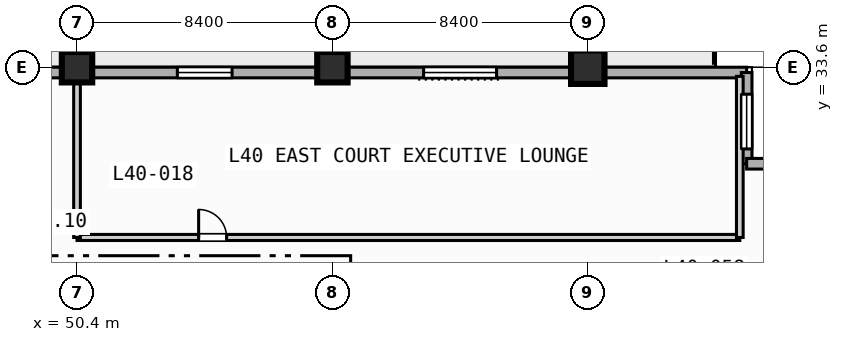
"""IFC4 building model, lengths in metres.
Left out: names, types, materials, properties, quantities, classifications, styles, units other than length and angle.
Written with IfcOpenShell. Run it as: python <this file> out.ifc"""

import sys

from ifc_helpers import new_model, si_unit, direction, frame, frame_2d, origin, origin_2d, place, context, subcontext, project, spatial, rectangle, extrude, element, fill, save


model = new_model("IFC4")
c1 = context("Model", 3, precision=1e-05, world=origin(), true_north=direction((0.0, 1.0)))
c2 = subcontext(c1, "Body", "Model", "MODEL_VIEW")
j1 = project(units=[si_unit("LENGTHUNIT", "METRE"), si_unit("PLANEANGLEUNIT", "RADIAN")], contexts=[c1])
p1 = place(None, origin())
s1 = spatial("IfcSite", under=j1, at=p1, CompositionType="ELEMENT")
p2 = place(p1, origin())
s2 = spatial("IfcBuilding", under=s1, at=p2, CompositionType="ELEMENT")
p3 = place(p2, frame((0.0, 0.0, 168.0)))
s3 = spatial("IfcBuildingStorey", under=s2, at=p3, CompositionType="ELEMENT", Elevation=168.0)
for number, where, z_axis, x_axis in (
    (1, (50.4, 33.6, 0.0), (0.0, 0.0, 1.0), (1.0, 0.0, 0.0)),
    (2, (58.8, 33.6, 0.0), (0.0, 0.0, 1.0), (1.0, 0.0, 0.0)),
):
    element("IfcColumn", number, at=place(p3, frame(where, z_axis=z_axis, x_axis=x_axis)), inside=s3, PredefinedType="COLUMN", context=c2, shape_type="SweptSolid", body=[
        extrude(rectangle(XDim=1.0, YDim=1.0, at=origin_2d()), origin(), (0.0, 0.0, 1.0), 3.7),
    ])
p4 = place(p3, frame((67.2, 33.6, 0.0), z_axis=(0.0, 0.0, 1.0), x_axis=(1.0, 0.0, 0.0)))
e3 = element("IfcColumn", 3, at=p4, inside=s3, PredefinedType="COLUMN", context=c2, shape_type="SweptSolid", body=[
    extrude(rectangle(XDim=1.1, YDim=1.1, at=origin_2d()), origin(), (0.0, 0.0, 1.0), 3.7),
])
p5 = place(p3, frame((33.425, 33.425, 0.0), z_axis=(0.0, 0.0, 1.0), x_axis=(1.0, 0.0, 0.0)))
e4 = element("IfcWall", 4, at=p5, inside=s3, PredefinedType="STANDARD", context=c2, shape_type="SweptSolid", body=[
    extrude(rectangle(XDim=39.0, YDim=0.35, at=frame_2d((19.5, 0.0))), origin(), (0.0, 0.0, 1.0), 3.47),
])
p6 = place(p5, frame((12.075, 0.0, 0.0)))
e5 = element("IfcOpeningElement", 5, at=p6, cuts=e4, PredefinedType="OPENING", context=c2, shape_type="SweptSolid", body=[
    extrude(rectangle(XDim=1.4, YDim=2.2, at=frame_2d((0.7, 1.1))), frame((0.0, 0.185, 0.0), z_axis=(0.0, -1.0, 0.0), x_axis=(1.0, 0.0, 0.0)), (0.0, 0.0, 1.0), 0.37),
])
p7 = place(p5, frame((20.275, 0.0, 0.85)))
e6 = element("IfcOpeningElement", 6, at=p7, cuts=e4, PredefinedType="OPENING", context=c2, shape_type="SweptSolid", body=[
    extrude(rectangle(XDim=1.8, YDim=1.8, at=frame_2d((0.9, 0.9))), frame((0.0, 0.185, 0.0), z_axis=(0.0, -1.0, 0.0), x_axis=(1.0, 0.0, 0.0)), (0.0, 0.0, 1.0), 0.37),
])
p8 = place(p5, frame((28.375, 0.0, 0.85)))
e7 = element("IfcOpeningElement", 7, at=p8, cuts=e4, PredefinedType="OPENING", context=c2, shape_type="SweptSolid", body=[
    extrude(rectangle(XDim=2.4, YDim=1.95, at=frame_2d((1.2, 0.975))), frame((0.0, 0.185, 0.0), z_axis=(0.0, -1.0, 0.0), x_axis=(1.0, 0.0, 0.0)), (0.0, 0.0, 1.0), 0.37),
])
p9 = place(p3, frame((72.425, 33.425, 0.0), z_axis=(0.0, 0.0, 1.0), x_axis=(0.0, -1.0, 0.0)))
e8 = element("IfcWall", 8, at=p9, inside=s3, PredefinedType="STANDARD", context=c2, shape_type="SweptSolid", body=[
    extrude(rectangle(XDim=3.0, YDim=0.35, at=frame_2d((1.5, 0.0))), origin(), (0.0, 0.0, 1.0), 3.47),
])
p10 = place(p9, frame((0.712, 0.0, 0.85)))
e9 = element("IfcOpeningElement", 9, at=p10, cuts=e8, PredefinedType="OPENING", context=c2, shape_type="SweptSolid", body=[
    extrude(rectangle(XDim=1.8, YDim=1.8, at=frame_2d((0.9, 0.9))), frame((0.0, 0.185, 0.0), z_axis=(0.0, -1.0, 0.0), x_axis=(1.0, 0.0, 0.0)), (0.0, 0.0, 1.0), 0.37),
])
p11 = place(p3, frame((72.425, 30.425, 0.0), z_axis=(0.0, 0.0, 1.0), x_axis=(1.0, 0.0, 0.0)))
e10 = element("IfcWall", 10, at=p11, inside=s3, PredefinedType="STANDARD", context=c2, shape_type="SweptSolid", body=[
    extrude(rectangle(XDim=3.0, YDim=0.35, at=frame_2d((1.5, 0.0))), origin(), (0.0, 0.0, 1.0), 3.47),
])
p12 = place(p3, frame((50.4, 28.0, 0.0), z_axis=(0.0, 0.0, 1.0), x_axis=(1.0, 0.0, 0.0)))
e11 = element("IfcWall", 11, at=p12, inside=s3, PredefinedType="PARTITIONING", context=c2, shape_type="SweptSolid", body=[
    extrude(rectangle(XDim=21.8, YDim=0.2, at=frame_2d((10.9, 0.0))), origin(), (0.0, 0.0, 1.0), 3.47),
])
p13 = place(p12, frame((4.0, 0.0, 0.0)))
e12 = element("IfcOpeningElement", 12, at=p13, cuts=e11, PredefinedType="OPENING", context=c2, shape_type="SweptSolid", body=[
    extrude(rectangle(XDim=0.92, YDim=2.1, at=frame_2d((0.46, 1.05))), frame((0.0, 0.11, 0.0), z_axis=(0.0, -1.0, 0.0), x_axis=(1.0, 0.0, 0.0)), (0.0, 0.0, 1.0), 0.22),
])
p14 = place(p3, frame((50.4, 28.0, 0.0), z_axis=(0.0, 0.0, 1.0), x_axis=(0.0, 1.0, 0.0)))
e13 = element("IfcWall", 13, at=p14, inside=s3, PredefinedType="PARTITIONING", context=c2, shape_type="SweptSolid", body=[
    extrude(rectangle(XDim=5.3, YDim=0.22, at=frame_2d((2.65, 0.0))), origin(), (0.0, 0.0, 1.0), 2.82),
])
p15 = place(p3, frame((72.2, 28.0, 0.0), z_axis=(0.0, 0.0, 1.0), x_axis=(0.0, 1.0, 0.0)))
e14 = element("IfcWall", 14, at=p15, inside=s3, PredefinedType="PARTITIONING", context=c2, shape_type="SweptSolid", body=[
    extrude(rectangle(XDim=5.3, YDim=0.22, at=frame_2d((2.65, 0.0))), origin(), (0.0, 0.0, 1.0), 3.47),
])
p16 = place(p7, origin())
e15 = element("IfcWindow", 15, at=p16, inside=s3, PartitioningType="SINGLE_PANEL", PredefinedType="WINDOW", context=c2, shape_type="SweptSolid", body=[
    extrude(rectangle(XDim=1.8, YDim=1.8, at=frame_2d((0.9, 0.9))), frame((0.0, 0.03, 0.0), z_axis=(0.0, -1.0, 0.0), x_axis=(1.0, 0.0, 0.0)), (0.0, 0.0, 1.0), 0.06),
])
fill(e6, e15)
p17 = place(p8, origin())
e16 = element("IfcWindow", 16, at=p17, inside=s3, PartitioningType="SINGLE_PANEL", PredefinedType="WINDOW", context=c2, shape_type="SweptSolid", body=[
    extrude(rectangle(XDim=2.4, YDim=1.95, at=frame_2d((1.2, 0.975))), frame((0.0, 0.03, 0.0), z_axis=(0.0, -1.0, 0.0), x_axis=(1.0, 0.0, 0.0)), (0.0, 0.0, 1.0), 0.06),
])
fill(e7, e16)
p18 = place(p10, origin())
e17 = element("IfcWindow", 17, at=p18, inside=s3, PartitioningType="SINGLE_PANEL", PredefinedType="WINDOW", context=c2, shape_type="SweptSolid", body=[
    extrude(rectangle(XDim=1.8, YDim=1.8, at=frame_2d((0.9, 0.9))), frame((0.0, 0.03, 0.0), z_axis=(0.0, -1.0, 0.0), x_axis=(1.0, 0.0, 0.0)), (0.0, 0.0, 1.0), 0.06),
])
fill(e9, e17)
p19 = place(p13, origin())
e18 = element("IfcDoor", 18, at=p19, inside=s3, OperationType="SINGLE_SWING_LEFT", PredefinedType="DOOR", context=c2, shape_type="SweptSolid", body=[
    extrude(rectangle(XDim=0.92, YDim=2.1, at=frame_2d((0.46, 1.05))), frame((0.0, 0.025, 0.0), z_axis=(0.0, -1.0, 0.0), x_axis=(1.0, 0.0, 0.0)), (0.0, 0.0, 1.0), 0.05),
])
fill(e12, e18)
save(model, sys.argv[1])
